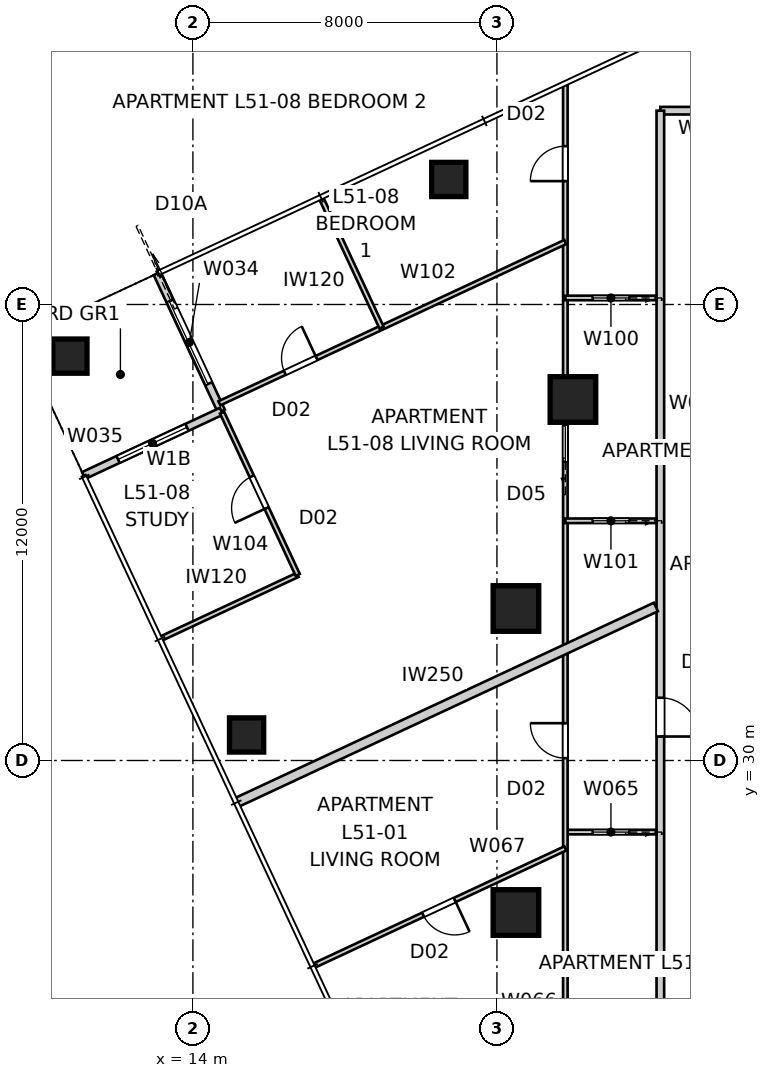
"""IFC4 building model, lengths in metres.
Left out: names, types, materials, properties, quantities, classifications, styles, units other than length and angle.
Written with IfcOpenShell. Run it as: python <this file> out.ifc"""

import sys

from ifc_helpers import new_model, si_unit, direction, frame, frame_2d, origin, origin_2d, place, context, subcontext, project, spatial, rectangle, extrude, element, fill, save


model = new_model("IFC4")
c1 = context("Model", 3, precision=1e-05, world=origin(), true_north=direction((0.0, 1.0)))
c2 = subcontext(c1, "Body", "Model", "MODEL_VIEW")
j1 = project(units=[si_unit("LENGTHUNIT", "METRE"), si_unit("PLANEANGLEUNIT", "RADIAN")], contexts=[c1])
p1 = place(None, origin())
s1 = spatial("IfcSite", under=j1, at=p1, CompositionType="ELEMENT")
p2 = place(p1, origin())
s2 = spatial("IfcBuilding", under=s1, at=p2, CompositionType="ELEMENT")
p3 = place(p2, frame((0.0, 0.0, 186.2)))
s3 = spatial("IfcBuildingStorey", under=s2, at=p3, CompositionType="ELEMENT", Elevation=186.2)
for number, where, z_axis, x_axis in (
    (1, (20.733, 45.29, 0.0), (0.0, 0.0, 1.0), (1.0, 0.0, 0.0)),
    (2, (10.764, 40.641, 0.0), (0.0, 0.0, 1.0), (1.0, 0.0, 0.0)),
    (3, (15.412, 30.672, 0.0), (0.0, 0.0, 1.0), (1.0, 0.0, 0.0)),
):
    element("IfcColumn", number, at=place(p3, frame(where, z_axis=z_axis, x_axis=x_axis)), inside=s3, PredefinedType="COLUMN", context=c2, shape_type="SweptSolid", body=[
        extrude(rectangle(XDim=0.9, YDim=0.9, at=origin_2d()), origin(), (0.0, 0.0, 1.0), 3.4),
    ])
for number, where, z_axis, x_axis in (
    (4, (24.0, 39.5, 0.0), (0.0, 0.0, 1.0), (1.0, 0.0, 0.0)),
    (5, (22.5, 34.0, 0.0), (0.0, 0.0, 1.0), (1.0, 0.0, 0.0)),
    (6, (22.5, 26.0, 0.0), (0.0, 0.0, 1.0), (1.0, 0.0, 0.0)),
):
    element("IfcColumn", number, at=place(p3, frame(where, z_axis=z_axis, x_axis=x_axis)), inside=s3, PredefinedType="COLUMN", context=c2, shape_type="SweptSolid", body=[
        extrude(rectangle(XDim=1.2, YDim=1.2, at=origin_2d()), origin(), (0.0, 0.0, 1.0), 3.4),
    ])
p4 = place(p3, frame((13.06, 42.815, 0.0), z_axis=(0.0, 0.0, 1.0), x_axis=(0.422658246362, -0.906289140828, 0.0)))
e7 = element("IfcWall", 7, at=p4, inside=s3, PredefinedType="SOLIDWALL", context=c2, shape_type="SweptSolid", body=[
    extrude(rectangle(XDim=4.0, YDim=0.2, at=frame_2d((2.0, 0.0))), origin(), (0.0, 0.0, 1.0), 3.25),
])
p5 = place(p4, frame((0.8, 0.0, 0.0)))
e8 = element("IfcOpeningElement", 8, at=p5, cuts=e7, PredefinedType="OPENING", context=c2, shape_type="SweptSolid", body=[
    extrude(rectangle(XDim=2.4, YDim=2.1, at=frame_2d((1.2, 1.05))), frame((0.0, 0.11, 0.0), z_axis=(0.0, -1.0, 0.0), x_axis=(1.0, 0.0, 0.0)), (0.0, 0.0, 1.0), 0.22),
])
p6 = place(p3, frame((14.75, 39.19, 0.0), z_axis=(0.0, 0.0, 1.0), x_axis=(-0.906289140828, -0.422658246362, 0.0)))
e9 = element("IfcWall", 9, at=p6, inside=s3, PredefinedType="SOLIDWALL", context=c2, shape_type="SweptSolid", body=[
    extrude(rectangle(XDim=4.0, YDim=0.2, at=frame_2d((2.0, 0.0))), origin(), (0.0, 0.0, 1.0), 3.25),
])
p7 = place(p6, frame((1.0, 0.0, 0.45)))
e10 = element("IfcOpeningElement", 10, at=p7, cuts=e9, PredefinedType="OPENING", context=c2, shape_type="SweptSolid", body=[
    extrude(rectangle(XDim=2.0, YDim=1.8, at=frame_2d((1.0, 0.9))), frame((0.0, 0.11, 0.0), z_axis=(0.0, -1.0, 0.0), x_axis=(1.0, 0.0, 0.0)), (0.0, 0.0, 1.0), 0.22),
])
p8 = place(p3, frame((33.692, 47.1, 0.0), z_axis=(0.0, 0.0, 1.0), x_axis=(-1.0, 0.0, 0.0)))
e11 = element("IfcWall", 11, at=p8, inside=s3, PredefinedType="PARTITIONING", context=c2, shape_type="SweptSolid", body=[
    extrude(rectangle(XDim=7.392, YDim=0.2, at=frame_2d((3.696, 0.0))), origin(), (0.0, 0.0, 1.0), 3.25),
])
p9 = place(p8, frame((3.957, 0.0, 0.0)))
e12 = element("IfcOpeningElement", 12, at=p9, cuts=e11, PredefinedType="OPENING", context=c2, shape_type="SweptSolid", body=[
    extrude(rectangle(XDim=1.02, YDim=2.34, at=frame_2d((0.51, 1.17))), frame((0.0, 0.11, 0.0), z_axis=(0.0, -1.0, 0.0), x_axis=(1.0, 0.0, 0.0)), (0.0, 0.0, 1.0), 0.22),
])
p10 = place(p3, frame((26.3, 47.1, 0.0), z_axis=(0.0, 0.0, 1.0), x_axis=(0.0, -1.0, 0.0)))
e13 = element("IfcWall", 13, at=p10, inside=s3, PredefinedType="PARTITIONING", context=c2, shape_type="SweptSolid", body=[
    extrude(rectangle(XDim=33.8, YDim=0.2, at=frame_2d((16.9, 0.0))), origin(), (0.0, 0.0, 1.0), 3.25),
])
p11 = place(p10, frame((15.449, 0.0, 0.0)))
e14 = element("IfcOpeningElement", 14, at=p11, cuts=e13, PredefinedType="OPENING", context=c2, shape_type="SweptSolid", body=[
    extrude(rectangle(XDim=1.02, YDim=2.34, at=frame_2d((0.51, 1.17))), frame((0.0, 0.11, 0.0), z_axis=(0.0, -1.0, 0.0), x_axis=(1.0, 0.0, 0.0)), (0.0, 0.0, 1.0), 0.22),
])
p12 = place(p10, frame((30.883, 0.0, 0.0)))
e15 = element("IfcOpeningElement", 15, at=p12, cuts=e13, PredefinedType="OPENING", context=c2, shape_type="SweptSolid", body=[
    extrude(rectangle(XDim=1.02, YDim=2.34, at=frame_2d((0.51, 1.17))), frame((0.0, 0.11, 0.0), z_axis=(0.0, -1.0, 0.0), x_axis=(1.0, 0.0, 0.0)), (0.0, 0.0, 1.0), 0.22),
])
p13 = place(p3, frame((15.14, 28.89, 0.0), z_axis=(0.0, 0.0, 1.0), x_axis=(0.906303906082, 0.422626584374, 0.0)))
e16 = element("IfcWall", 16, at=p13, inside=s3, PredefinedType="PARTITIONING", context=c2, shape_type="SweptSolid", body=[
    extrude(rectangle(XDim=12.185, YDim=0.25, at=frame_2d((6.092, 0.0))), origin(), (0.0, 0.0, 1.0), 3.25),
])
p14 = place(p3, frame((26.2, 28.116, 0.0), z_axis=(0.0, 0.0, 1.0), x_axis=(-1.0, 0.0, 0.0)))
e17 = element("IfcWall", 17, at=p14, inside=s3, PredefinedType="PARTITIONING", context=c2, shape_type="SweptSolid", body=[
    extrude(rectangle(XDim=2.4, YDim=0.12, at=frame_2d((1.2, 0.0))), origin(), (0.0, 0.0, 1.0), 3.25),
])
p15 = place(p14, frame((0.72, 0.0, 0.0)))
e18 = element("IfcOpeningElement", 18, at=p15, cuts=e17, PredefinedType="OPENING", context=c2, shape_type="SweptSolid", body=[
    extrude(rectangle(XDim=0.96, YDim=2.1, at=frame_2d((0.48, 1.05))), frame((0.0, 0.07, 0.0), z_axis=(0.0, -1.0, 0.0), x_axis=(1.0, 0.0, 0.0)), (0.0, 0.0, 1.0), 0.14),
])
p16 = place(p3, frame((23.8, 17.205, 0.0), z_axis=(0.0, 0.0, 1.0), x_axis=(0.0, 1.0, 0.0)))
e19 = element("IfcWall", 19, at=p16, inside=s3, PredefinedType="PARTITIONING", context=c2, shape_type="SweptSolid", body=[
    extrude(rectangle(XDim=30.574, YDim=0.12, at=frame_2d((15.287, 0.0))), origin(), (0.0, 0.0, 1.0), 2.55),
])
p17 = place(p16, frame((12.857, 0.0, 0.0)))
e20 = element("IfcOpeningElement", 20, at=p17, cuts=e19, PredefinedType="OPENING", context=c2, shape_type="SweptSolid", body=[
    extrude(rectangle(XDim=0.92, YDim=2.34, at=frame_2d((0.46, 1.17))), frame((0.0, 0.07, 0.0), z_axis=(0.0, -1.0, 0.0), x_axis=(1.0, 0.0, 0.0)), (0.0, 0.0, 1.0), 0.14),
])
p18 = place(p16, frame((28.042, 0.0, 0.0)))
e21 = element("IfcOpeningElement", 21, at=p18, cuts=e19, PredefinedType="OPENING", context=c2, shape_type="SweptSolid", body=[
    extrude(rectangle(XDim=0.92, YDim=2.34, at=frame_2d((0.46, 1.17))), frame((0.0, 0.07, 0.0), z_axis=(0.0, -1.0, 0.0), x_axis=(1.0, 0.0, 0.0)), (0.0, 0.0, 1.0), 0.14),
])
p19 = place(p16, frame((20.655, 0.0, 0.0)))
e22 = element("IfcOpeningElement", 22, at=p19, cuts=e19, PredefinedType="OPENING", context=c2, shape_type="SweptSolid", body=[
    extrude(rectangle(XDim=0.96, YDim=2.1, at=frame_2d((0.48, 1.05))), frame((0.0, 0.07, 0.0), z_axis=(0.0, -1.0, 0.0), x_axis=(1.0, 0.0, 0.0)), (0.0, 0.0, 1.0), 0.14),
])
p20 = place(p3, frame((23.8, 27.687, 0.0), z_axis=(0.0, 0.0, 1.0), x_axis=(-0.906306986906, -0.422619977621, 0.0)))
e23 = element("IfcWall", 23, at=p20, inside=s3, PredefinedType="PARTITIONING", context=c2, shape_type="SweptSolid", body=[
    extrude(rectangle(XDim=7.3, YDim=0.12, at=frame_2d((3.65, 0.0))), origin(), (0.0, 0.0, 1.0), 3.25),
])
p21 = place(p20, frame((3.21, 0.0, 0.0)))
e24 = element("IfcOpeningElement", 24, at=p21, cuts=e23, PredefinedType="OPENING", context=c2, shape_type="SweptSolid", body=[
    extrude(rectangle(XDim=0.92, YDim=2.34, at=frame_2d((0.46, 1.17))), frame((0.0, 0.07, 0.0), z_axis=(0.0, -1.0, 0.0), x_axis=(1.0, 0.0, 0.0)), (0.0, 0.0, 1.0), 0.14),
])
p22 = place(p3, frame((26.2, 42.172, 0.0), z_axis=(0.0, 0.0, 1.0), x_axis=(-1.0, 0.0, 0.0)))
e25 = element("IfcWall", 25, at=p22, inside=s3, PredefinedType="PARTITIONING", context=c2, shape_type="SweptSolid", body=[
    extrude(rectangle(XDim=2.4, YDim=0.12, at=frame_2d((1.2, 0.0))), origin(), (0.0, 0.0, 1.0), 3.25),
])
p23 = place(p22, frame((0.72, 0.0, 0.0)))
e26 = element("IfcOpeningElement", 26, at=p23, cuts=e25, PredefinedType="OPENING", context=c2, shape_type="SweptSolid", body=[
    extrude(rectangle(XDim=0.96, YDim=2.1, at=frame_2d((0.48, 1.05))), frame((0.0, 0.07, 0.0), z_axis=(0.0, -1.0, 0.0), x_axis=(1.0, 0.0, 0.0)), (0.0, 0.0, 1.0), 0.14),
])
p24 = place(p3, frame((26.2, 36.308, 0.0), z_axis=(0.0, 0.0, 1.0), x_axis=(-1.0, 0.0, 0.0)))
e27 = element("IfcWall", 27, at=p24, inside=s3, PredefinedType="PARTITIONING", context=c2, shape_type="SweptSolid", body=[
    extrude(rectangle(XDim=2.4, YDim=0.12, at=frame_2d((1.2, 0.0))), origin(), (0.0, 0.0, 1.0), 3.25),
])
p25 = place(p24, frame((0.72, 0.0, 0.0)))
e28 = element("IfcOpeningElement", 28, at=p25, cuts=e27, PredefinedType="OPENING", context=c2, shape_type="SweptSolid", body=[
    extrude(rectangle(XDim=0.96, YDim=2.1, at=frame_2d((0.48, 1.05))), frame((0.0, 0.07, 0.0), z_axis=(0.0, -1.0, 0.0), x_axis=(1.0, 0.0, 0.0)), (0.0, 0.0, 1.0), 0.14),
])
p26 = place(p3, frame((14.697, 39.4, 0.0), z_axis=(0.0, 0.0, 1.0), x_axis=(0.906300466163, 0.422633961049, 0.0)))
e29 = element("IfcWall", 29, at=p26, inside=s3, PredefinedType="PARTITIONING", context=c2, shape_type="SweptSolid", body=[
    extrude(rectangle(XDim=10.044, YDim=0.12, at=frame_2d((5.022, 0.0))), origin(), (0.0, 0.0, 1.0), 3.25),
])
p27 = place(p26, frame((1.9, 0.0, 0.0)))
e30 = element("IfcOpeningElement", 30, at=p27, cuts=e29, PredefinedType="OPENING", context=c2, shape_type="SweptSolid", body=[
    extrude(rectangle(XDim=0.92, YDim=2.34, at=frame_2d((0.46, 1.17))), frame((0.0, 0.07, 0.0), z_axis=(0.0, -1.0, 0.0), x_axis=(1.0, 0.0, 0.0)), (0.0, 0.0, 1.0), 0.14),
])
p28 = place(p3, frame((13.169, 33.211, 0.0), z_axis=(0.0, 0.0, 1.0), x_axis=(0.906277619727, 0.422682949718, 0.0)))
e31 = element("IfcWall", 31, at=p28, inside=s3, PredefinedType="PARTITIONING", context=c2, shape_type="SweptSolid", body=[
    extrude(rectangle(XDim=3.96, YDim=0.12, at=frame_2d((1.98, 0.0))), origin(), (0.0, 0.0, 1.0), 3.25),
])
p29 = place(p3, frame((16.758, 34.885, 0.0), z_axis=(0.0, 0.0, 1.0), x_axis=(-0.422621536194, 0.906306260127, 0.0)))
e32 = element("IfcWall", 32, at=p29, inside=s3, PredefinedType="PARTITIONING", context=c2, shape_type="SweptSolid", body=[
    extrude(rectangle(XDim=4.71, YDim=0.12, at=frame_2d((2.355, 0.0))), origin(), (0.0, 0.0, 1.0), 3.25),
])
p30 = place(p29, frame((1.94, 0.0, 0.0)))
e33 = element("IfcOpeningElement", 33, at=p30, cuts=e32, PredefinedType="OPENING", context=c2, shape_type="SweptSolid", body=[
    extrude(rectangle(XDim=0.92, YDim=2.34, at=frame_2d((0.46, 1.17))), frame((0.0, 0.07, 0.0), z_axis=(0.0, -1.0, 0.0), x_axis=(1.0, 0.0, 0.0)), (0.0, 0.0, 1.0), 0.14),
])
p31 = place(p3, frame((18.965, 41.391, 0.0), z_axis=(0.0, 0.0, 1.0), x_axis=(-0.422600090785, 0.906316260071, 0.0)))
e34 = element("IfcWall", 34, at=p31, inside=s3, PredefinedType="PARTITIONING", context=c2, shape_type="SweptSolid", body=[
    extrude(rectangle(XDim=3.747, YDim=0.12, at=frame_2d((1.874, 0.0))), origin(), (0.0, 0.0, 1.0), 3.25),
])
p32 = place(p5, origin())
e35 = element("IfcDoor", 35, at=p32, inside=s3, OperationType="SLIDING_TO_LEFT", PredefinedType="DOOR", context=c2, shape_type="SweptSolid", body=[
    extrude(rectangle(XDim=2.4, YDim=2.1, at=frame_2d((1.2, 1.05))), frame((0.0, 0.025, 0.0), z_axis=(0.0, -1.0, 0.0), x_axis=(1.0, 0.0, 0.0)), (0.0, 0.0, 1.0), 0.05),
])
fill(e8, e35)
p33 = place(p7, origin())
e36 = element("IfcWindow", 36, at=p33, inside=s3, PartitioningType="SINGLE_PANEL", PredefinedType="WINDOW", context=c2, shape_type="SweptSolid", body=[
    extrude(rectangle(XDim=2.0, YDim=1.8, at=frame_2d((1.0, 0.9))), frame((0.0, 0.03, 0.0), z_axis=(0.0, -1.0, 0.0), x_axis=(1.0, 0.0, 0.0)), (0.0, 0.0, 1.0), 0.06),
])
fill(e10, e36)
p34 = place(p11, origin())
e37 = element("IfcDoor", 37, at=p34, inside=s3, OperationType="SINGLE_SWING_RIGHT", PredefinedType="DOOR", context=c2, shape_type="SweptSolid", body=[
    extrude(rectangle(XDim=1.02, YDim=2.34, at=frame_2d((0.51, 1.17))), frame((0.0, 0.025, 0.0), z_axis=(0.0, -1.0, 0.0), x_axis=(1.0, 0.0, 0.0)), (0.0, 0.0, 1.0), 0.05),
])
fill(e14, e37)
p35 = place(p17, origin())
e38 = element("IfcDoor", 38, at=p35, inside=s3, OperationType="SINGLE_SWING_RIGHT", PredefinedType="DOOR", context=c2, shape_type="SweptSolid", body=[
    extrude(rectangle(XDim=0.92, YDim=2.34, at=frame_2d((0.46, 1.17))), frame((0.0, 0.025, 0.0), z_axis=(0.0, -1.0, 0.0), x_axis=(1.0, 0.0, 0.0)), (0.0, 0.0, 1.0), 0.05),
])
fill(e20, e38)
p36 = place(p15, origin())
e39 = element("IfcDoor", 39, at=p36, inside=s3, OperationType="SLIDING_TO_LEFT", PredefinedType="DOOR", context=c2, shape_type="SweptSolid", body=[
    extrude(rectangle(XDim=0.96, YDim=2.1, at=frame_2d((0.48, 1.05))), frame((0.0, 0.025, 0.0), z_axis=(0.0, -1.0, 0.0), x_axis=(1.0, 0.0, 0.0)), (0.0, 0.0, 1.0), 0.05),
])
fill(e18, e39)
p37 = place(p18, origin())
e40 = element("IfcDoor", 40, at=p37, inside=s3, OperationType="SINGLE_SWING_LEFT", PredefinedType="DOOR", context=c2, shape_type="SweptSolid", body=[
    extrude(rectangle(XDim=0.92, YDim=2.34, at=frame_2d((0.46, 1.17))), frame((0.0, 0.025, 0.0), z_axis=(0.0, -1.0, 0.0), x_axis=(1.0, 0.0, 0.0)), (0.0, 0.0, 1.0), 0.05),
])
fill(e21, e40)
p38 = place(p23, origin())
e41 = element("IfcDoor", 41, at=p38, inside=s3, OperationType="SLIDING_TO_LEFT", PredefinedType="DOOR", context=c2, shape_type="SweptSolid", body=[
    extrude(rectangle(XDim=0.96, YDim=2.1, at=frame_2d((0.48, 1.05))), frame((0.0, 0.025, 0.0), z_axis=(0.0, -1.0, 0.0), x_axis=(1.0, 0.0, 0.0)), (0.0, 0.0, 1.0), 0.05),
])
fill(e26, e41)
p39 = place(p21, origin())
e42 = element("IfcDoor", 42, at=p39, inside=s3, OperationType="SINGLE_SWING_LEFT", PredefinedType="DOOR", context=c2, shape_type="SweptSolid", body=[
    extrude(rectangle(XDim=0.92, YDim=2.34, at=frame_2d((0.46, 1.17))), frame((0.0, 0.025, 0.0), z_axis=(0.0, -1.0, 0.0), x_axis=(1.0, 0.0, 0.0)), (0.0, 0.0, 1.0), 0.05),
])
fill(e24, e42)
p40 = place(p19, origin())
e43 = element("IfcDoor", 43, at=p40, inside=s3, OperationType="SLIDING_TO_LEFT", PredefinedType="DOOR", context=c2, shape_type="SweptSolid", body=[
    extrude(rectangle(XDim=0.96, YDim=2.1, at=frame_2d((0.48, 1.05))), frame((0.0, 0.025, 0.0), z_axis=(0.0, -1.0, 0.0), x_axis=(1.0, 0.0, 0.0)), (0.0, 0.0, 1.0), 0.05),
])
fill(e22, e43)
p41 = place(p25, origin())
e44 = element("IfcDoor", 44, at=p41, inside=s3, OperationType="SLIDING_TO_LEFT", PredefinedType="DOOR", context=c2, shape_type="SweptSolid", body=[
    extrude(rectangle(XDim=0.96, YDim=2.1, at=frame_2d((0.48, 1.05))), frame((0.0, 0.025, 0.0), z_axis=(0.0, -1.0, 0.0), x_axis=(1.0, 0.0, 0.0)), (0.0, 0.0, 1.0), 0.05),
])
fill(e28, e44)
p42 = place(p27, origin())
e45 = element("IfcDoor", 45, at=p42, inside=s3, OperationType="SINGLE_SWING_RIGHT", PredefinedType="DOOR", context=c2, shape_type="SweptSolid", body=[
    extrude(rectangle(XDim=0.92, YDim=2.34, at=frame_2d((0.46, 1.17))), frame((0.0, 0.025, 0.0), z_axis=(0.0, -1.0, 0.0), x_axis=(1.0, 0.0, 0.0)), (0.0, 0.0, 1.0), 0.05),
])
fill(e30, e45)
p43 = place(p30, origin())
e46 = element("IfcDoor", 46, at=p43, inside=s3, OperationType="SINGLE_SWING_LEFT", PredefinedType="DOOR", context=c2, shape_type="SweptSolid", body=[
    extrude(rectangle(XDim=0.92, YDim=2.34, at=frame_2d((0.46, 1.17))), frame((0.0, 0.025, 0.0), z_axis=(0.0, -1.0, 0.0), x_axis=(1.0, 0.0, 0.0)), (0.0, 0.0, 1.0), 0.05),
])
fill(e33, e46)
save(model, sys.argv[1])
